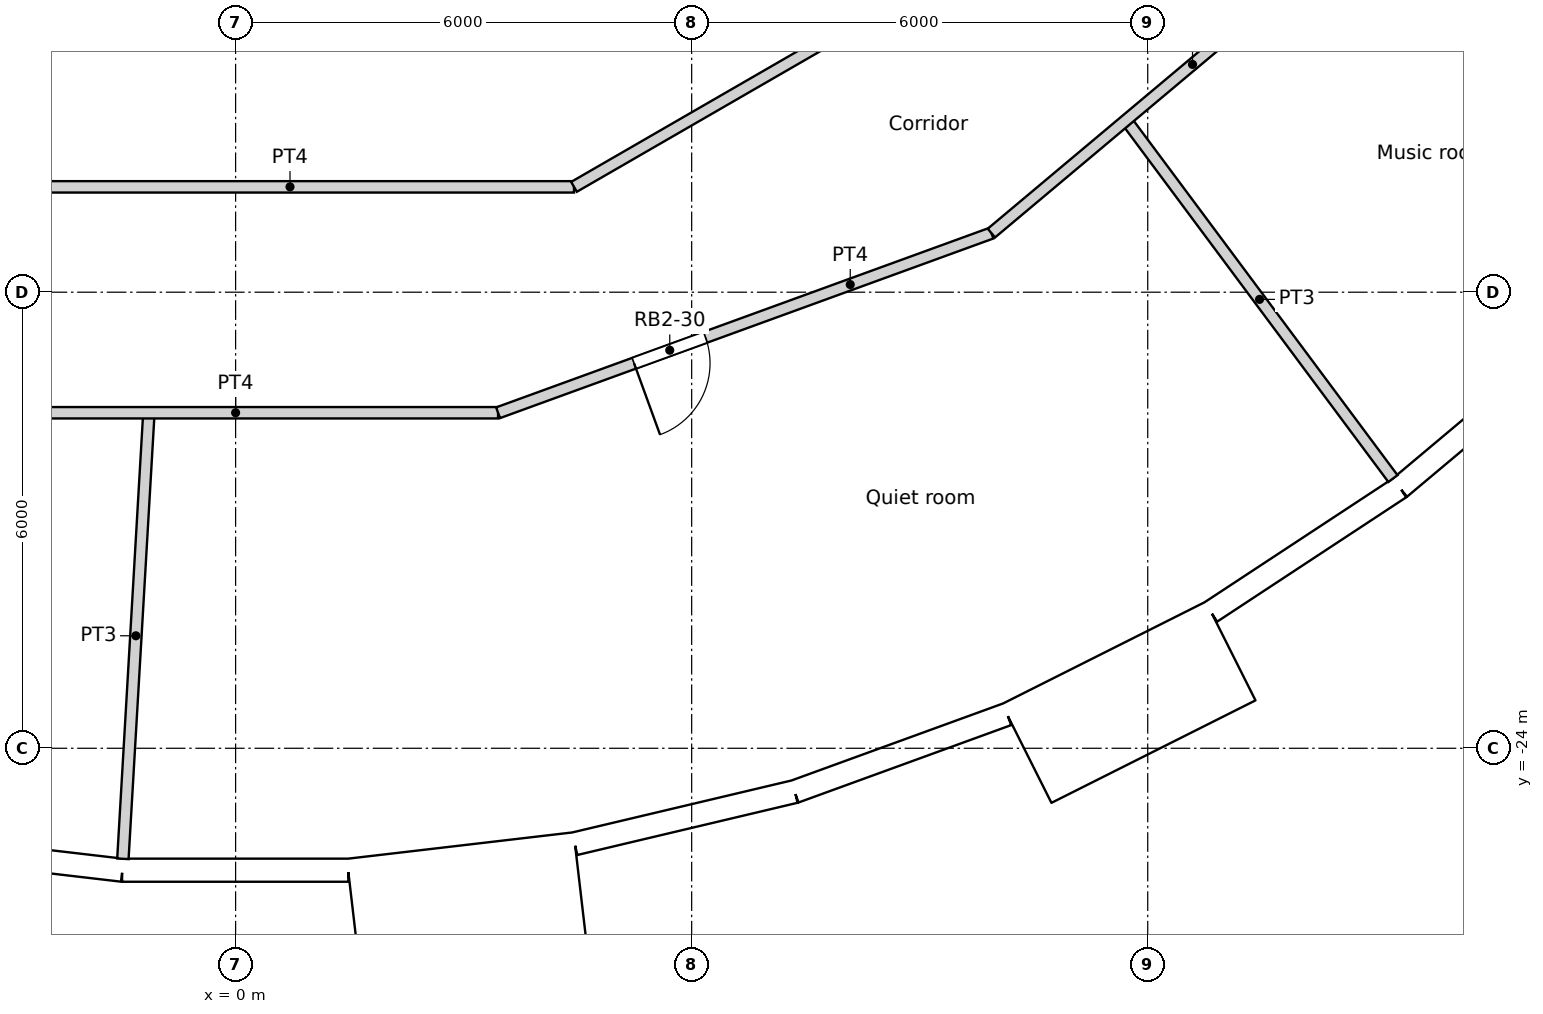
"""IFC4 building model, lengths in metres.
Left out: names, types, materials, properties, quantities, classifications, styles, units other than length and angle.
Written with IfcOpenShell. Run it as: python <this file> out.ifc"""

import sys

from ifc_helpers import new_model, si_unit, direction, frame, frame_2d, origin, origin_2d, place, context, subcontext, project, spatial, rectangle, circle, extrude, element, fill, save


model = new_model("IFC4")
c1 = context("Model", 3, precision=1e-05, world=origin(), true_north=direction((0.0, 1.0)))
c2 = subcontext(c1, "Body", "Model", "MODEL_VIEW")
j1 = project(units=[si_unit("LENGTHUNIT", "METRE"), si_unit("PLANEANGLEUNIT", "RADIAN")], contexts=[c1])
p1 = place(None, origin())
s1 = spatial("IfcSite", under=j1, at=p1, CompositionType="ELEMENT")
p2 = place(p1, origin())
s2 = spatial("IfcBuilding", under=s1, at=p2, CompositionType="ELEMENT")
p3 = place(p2, frame((0.0, 0.0, 136.8)))
s3 = spatial("IfcBuildingStorey", under=s2, at=p3, CompositionType="ELEMENT", Elevation=136.8)
for number, where, z_axis, x_axis in (
    (1, (-1.427, -24.506, 0.0), (0.0, 0.0, 1.0), (1.0, 0.0, 0.0)),
    (2, (4.263, -24.175, 0.0), (0.0, 0.0, 1.0), (1.0, 0.0, 0.0)),
    (3, (9.723, -22.54, 0.0), (0.0, 0.0, 1.0), (1.0, 0.0, 0.0)),
    (4, (14.659, -19.69, 0.0), (0.0, 0.0, 1.0), (1.0, 0.0, 0.0)),
):
    element("IfcColumn", number, at=place(p3, frame(where, z_axis=z_axis, x_axis=x_axis)), inside=s3, PredefinedType="COLUMN", context=c2, shape_type="SweptSolid", body=[
        extrude(circle(Radius=0.6, at=origin_2d()), origin(), (0.0, 0.0, 1.0), 3.6),
    ])
for number, where, z_axis, x_axis in (
    (5, (1.406, -18.77, 0.0), (0.0, 0.0, 1.0), (1.0, 0.0, 0.0)),
    (6, (6.876, -17.521, 0.0), (0.0, 0.0, 1.0), (1.0, 0.0, 0.0)),
    (7, (11.735, -14.716, 0.0), (0.0, 0.0, 1.0), (1.0, 0.0, 0.0)),
):
    element("IfcColumn", number, at=place(p3, frame(where, z_axis=z_axis, x_axis=x_axis)), inside=s3, PredefinedType="COLUMN", context=c2, shape_type="SweptSolid", body=[
        extrude(circle(Radius=0.65, at=origin_2d()), origin(), (0.0, 0.0, 1.0), 3.6),
    ])
p4 = place(p3, frame((-4.444, -25.259, 0.0), z_axis=(0.0, 0.0, 1.0), x_axis=(0.993245010522, -0.1160359818, 0.0)))
e8 = element("IfcWall", 8, at=p4, inside=s3, PredefinedType="SOLIDWALL", context=c2, shape_type="SweptSolid", body=[
    extrude(rectangle(XDim=2.973, YDim=0.3, at=frame_2d((1.486, 0.0))), origin(), (0.0, 0.0, 1.0), 2.8),
])
p5 = place(p4, frame((1.486, 0.0, 1.55)))
e9 = element("IfcOpeningElement", 9, at=p5, cuts=e8, PredefinedType="OPENING", context=c2, shape_type="SweptSolid", body=[
    extrude(circle(Radius=0.9, at=origin_2d()), frame((0.0, 0.16, 0.0), z_axis=(0.0, -1.0, 0.0), x_axis=(1.0, 0.0, 0.0)), (0.0, 0.0, 1.0), 0.32),
])
p6 = place(p3, frame((-1.491, -25.604, 0.0), z_axis=(0.0, 0.0, 1.0), x_axis=(1.0, 0.0, 0.0)))
e10 = element("IfcWall", 10, at=p6, inside=s3, PredefinedType="SOLIDWALL", context=c2, shape_type="SweptSolid", body=[
    extrude(rectangle(XDim=2.973, YDim=0.3, at=frame_2d((1.486, 0.0))), origin(), (0.0, 0.0, 1.0), 3.3),
])
p7 = place(p6, frame((1.486, 0.0, 1.55)))
e11 = element("IfcOpeningElement", 11, at=p7, cuts=e10, PredefinedType="OPENING", context=c2, shape_type="SweptSolid", body=[
    extrude(circle(Radius=0.9, at=origin_2d()), frame((0.0, 0.16, 0.0), z_axis=(0.0, -1.0, 0.0), x_axis=(1.0, 0.0, 0.0)), (0.0, 0.0, 1.0), 0.32),
])
p8 = place(p3, frame((1.549, -26.176, -0.3), z_axis=(0.0, 0.0, 1.0), x_axis=(0.9932342274, 0.116128246006, 0.0)))
e12 = element("IfcWall", 12, at=p8, inside=s3, PredefinedType="ELEMENTEDWALL", context=c2, shape_type="SweptSolid", body=[
    extrude(rectangle(XDim=3.0, YDim=1.45, at=frame_2d((1.5, 0.0))), origin(), (0.0, 0.0, 1.0), 3.6),
])
p9 = place(p8, frame((1.5, 0.0, 1.85)))
e13 = element("IfcOpeningElement", 13, at=p9, cuts=e12, PredefinedType="OPENING", context=c2, shape_type="SweptSolid", body=[
    extrude(circle(Radius=0.9, at=origin_2d()), frame((0.0, 0.735, 0.0), z_axis=(0.0, -1.0, 0.0), x_axis=(1.0, 0.0, 0.0)), (0.0, 0.0, 1.0), 1.47),
])
p10 = place(p3, frame((4.463, -25.256, 0.0), z_axis=(0.0, 0.0, 1.0), x_axis=(0.973045378923, 0.230613725862, 0.0)))
e14 = element("IfcWall", 14, at=p10, inside=s3, PredefinedType="SOLIDWALL", context=c2, shape_type="SweptSolid", body=[
    extrude(rectangle(XDim=2.973, YDim=0.3, at=frame_2d((1.486, 0.0))), origin(), (0.0, 0.0, 1.0), 2.8),
])
p11 = place(p10, frame((1.486, 0.0, 1.55)))
e15 = element("IfcOpeningElement", 15, at=p11, cuts=e14, PredefinedType="OPENING", context=c2, shape_type="SweptSolid", body=[
    extrude(circle(Radius=0.9, at=origin_2d()), frame((0.0, 0.16, 0.0), z_axis=(0.0, -1.0, 0.0), x_axis=(1.0, 0.0, 0.0)), (0.0, 0.0, 1.0), 0.32),
])
p12 = place(p3, frame((7.356, -24.57, 0.0), z_axis=(0.0, 0.0, 1.0), x_axis=(0.939690282133, 0.342026568652, 0.0)))
e16 = element("IfcWall", 16, at=p12, inside=s3, PredefinedType="SOLIDWALL", context=c2, shape_type="SweptSolid", body=[
    extrude(rectangle(XDim=2.973, YDim=0.3, at=frame_2d((1.486, 0.0))), origin(), (0.0, 0.0, 1.0), 3.3),
])
p13 = place(p12, frame((1.486, 0.0, 1.55)))
e17 = element("IfcOpeningElement", 17, at=p13, cuts=e16, PredefinedType="OPENING", context=c2, shape_type="SweptSolid", body=[
    extrude(circle(Radius=0.9, at=origin_2d()), frame((0.0, 0.16, 0.0), z_axis=(0.0, -1.0, 0.0), x_axis=(1.0, 0.0, 0.0)), (0.0, 0.0, 1.0), 0.32),
])
p14 = place(p3, frame((10.409, -24.068, -0.3), z_axis=(0.0, 0.0, 1.0), x_axis=(0.893628249713, 0.448807922518, 0.0)))
e18 = element("IfcWall", 18, at=p14, inside=s3, PredefinedType="ELEMENTEDWALL", context=c2, shape_type="SweptSolid", body=[
    extrude(rectangle(XDim=3.0, YDim=1.45, at=frame_2d((1.5, 0.0))), origin(), (0.0, 0.0, 1.0), 3.6),
])
p15 = place(p14, frame((1.5, 0.0, 1.85)))
e19 = element("IfcOpeningElement", 19, at=p15, cuts=e18, PredefinedType="OPENING", context=c2, shape_type="SweptSolid", body=[
    extrude(circle(Radius=0.9, at=origin_2d()), frame((0.0, 0.735, 0.0), z_axis=(0.0, -1.0, 0.0), x_axis=(1.0, 0.0, 0.0)), (0.0, 0.0, 1.0), 1.47),
])
p16 = place(p3, frame((12.832, -22.206, 0.0), z_axis=(0.0, 0.0, 1.0), x_axis=(0.835508361394, 0.54947773207, 0.0)))
e20 = element("IfcWall", 20, at=p16, inside=s3, PredefinedType="SOLIDWALL", context=c2, shape_type="SweptSolid", body=[
    extrude(rectangle(XDim=2.973, YDim=0.3, at=frame_2d((1.486, 0.0))), origin(), (0.0, 0.0, 1.0), 2.8),
])
p17 = place(p16, frame((1.486, 0.0, 1.55)))
e21 = element("IfcOpeningElement", 21, at=p17, cuts=e20, PredefinedType="OPENING", context=c2, shape_type="SweptSolid", body=[
    extrude(circle(Radius=0.9, at=origin_2d()), frame((0.0, 0.16, 0.0), z_axis=(0.0, -1.0, 0.0), x_axis=(1.0, 0.0, 0.0)), (0.0, 0.0, 1.0), 0.32),
])
p18 = place(p3, frame((15.316, -20.573, 0.0), z_axis=(0.0, 0.0, 1.0), x_axis=(0.766008913364, 0.642829950023, 0.0)))
e22 = element("IfcWall", 22, at=p18, inside=s3, PredefinedType="SOLIDWALL", context=c2, shape_type="SweptSolid", body=[
    extrude(rectangle(XDim=2.973, YDim=0.3, at=frame_2d((1.486, 0.0))), origin(), (0.0, 0.0, 1.0), 3.3),
])
p19 = place(p18, frame((1.486, 0.0, 1.55)))
e23 = element("IfcOpeningElement", 23, at=p19, cuts=e22, PredefinedType="OPENING", context=c2, shape_type="SweptSolid", body=[
    extrude(circle(Radius=0.9, at=origin_2d()), frame((0.0, 0.16, 0.0), z_axis=(0.0, -1.0, 0.0), x_axis=(1.0, 0.0, 0.0)), (0.0, 0.0, 1.0), 0.32),
])
p20 = place(p3, frame((9.943, -17.222, 0.0), z_axis=(0.0, 0.0, 1.0), x_axis=(0.766192104565, 0.642611592567, 0.0)))
e24 = element("IfcWall", 24, at=p20, inside=s3, PredefinedType="PARTITIONING", context=c2, shape_type="SweptSolid", body=[
    extrude(rectangle(XDim=6.906, YDim=0.15, at=frame_2d((3.453, 0.0))), origin(), (0.0, 0.0, 1.0), 3.3),
])
p21 = place(p3, frame((-3.021, -16.614, 0.0), z_axis=(0.0, 0.0, 1.0), x_axis=(1.0, 0.0, 0.0)))
e25 = element("IfcWall", 25, at=p21, inside=s3, PredefinedType="PARTITIONING", context=c2, shape_type="SweptSolid", body=[
    extrude(rectangle(XDim=7.473, YDim=0.15, at=frame_2d((3.736, 0.0))), origin(), (0.0, 0.0, 1.0), 3.3),
])
p22 = place(p3, frame((4.452, -16.614, 0.0), z_axis=(0.0, 0.0, 1.0), x_axis=(0.866005203721, 0.500034985904, 0.0)))
e26 = element("IfcWall", 26, at=p22, inside=s3, PredefinedType="PARTITIONING", context=c2, shape_type="SweptSolid", body=[
    extrude(rectangle(XDim=8.903, YDim=0.15, at=frame_2d((4.452, 0.0))), origin(), (0.0, 0.0, 1.0), 3.3),
])
p23 = place(p3, frame((-3.453, -19.586, 0.0), z_axis=(0.0, 0.0, 1.0), x_axis=(1.0, 0.0, 0.0)))
e27 = element("IfcWall", 27, at=p23, inside=s3, PredefinedType="PARTITIONING", context=c2, shape_type="SweptSolid", body=[
    extrude(rectangle(XDim=6.906, YDim=0.15, at=frame_2d((3.453, 0.0))), origin(), (0.0, 0.0, 1.0), 3.3),
])
p24 = place(p3, frame((3.453, -19.586, 0.0), z_axis=(0.0, 0.0, 1.0), x_axis=(0.939672634566, 0.342075050021, 0.0)))
e28 = element("IfcWall", 28, at=p24, inside=s3, PredefinedType="PARTITIONING", context=c2, shape_type="SweptSolid", body=[
    extrude(rectangle(XDim=6.908, YDim=0.15, at=frame_2d((3.454, 0.0))), origin(), (0.0, 0.0, 1.0), 3.3),
])
p25 = place(p24, frame((1.904, 0.0, 0.0)))
e29 = element("IfcOpeningElement", 29, at=p25, cuts=e28, PredefinedType="OPENING", context=c2, shape_type="SweptSolid", body=[
    extrude(rectangle(XDim=1.0, YDim=2.04, at=frame_2d((0.5, 1.02))), frame((0.0, 0.075, 0.0), z_axis=(0.0, -1.0, 0.0), x_axis=(1.0, 0.0, 0.0)), (0.0, 0.0, 1.0), 0.15),
])
p26 = place(p3, frame((-1.483, -25.454, 0.0), z_axis=(0.0, 0.0, 1.0), x_axis=(0.058147412668, 0.998308007781, 0.0)))
e30 = element("IfcWall", 30, at=p26, inside=s3, PredefinedType="PARTITIONING", context=c2, shape_type="SweptSolid", body=[
    extrude(rectangle(XDim=5.878, YDim=0.15, at=frame_2d((2.939, 0.0))), origin(), (0.0, 0.0, 1.0), 3.3),
])
p27 = place(p3, frame((11.716, -15.737, 0.0), z_axis=(0.0, 0.0, 1.0), x_axis=(0.597151875745, -0.802128192557, 0.0)))
e31 = element("IfcWall", 31, at=p27, inside=s3, PredefinedType="PARTITIONING", context=c2, shape_type="SweptSolid", body=[
    extrude(rectangle(XDim=5.878, YDim=0.15, at=frame_2d((2.939, 0.0))), origin(), (0.0, 0.0, 1.0), 3.3),
])
p28 = place(p5, origin())
e32 = element("IfcWindow", 32, at=p28, inside=s3, PartitioningType="SINGLE_PANEL", PredefinedType="WINDOW", context=c2, shape_type="SweptSolid", body=[
    extrude(circle(Radius=0.9, at=origin_2d()), frame((0.0, 0.12, 0.0), z_axis=(0.0, -1.0, 0.0), x_axis=(1.0, 0.0, 0.0)), (0.0, 0.0, 1.0), 0.1),
])
fill(e9, e32)
p29 = place(p7, origin())
e33 = element("IfcWindow", 33, at=p29, inside=s3, PartitioningType="SINGLE_PANEL", PredefinedType="WINDOW", context=c2, shape_type="SweptSolid", body=[
    extrude(circle(Radius=0.9, at=origin_2d()), frame((0.0, 0.12, 0.0), z_axis=(0.0, -1.0, 0.0), x_axis=(1.0, 0.0, 0.0)), (0.0, 0.0, 1.0), 0.1),
])
fill(e11, e33)
p30 = place(p9, origin())
e34 = element("IfcWindow", 34, at=p30, inside=s3, PartitioningType="SINGLE_PANEL", PredefinedType="WINDOW", context=c2, shape_type="SweptSolid", body=[
    extrude(circle(Radius=0.9, at=origin_2d()), frame((0.0, 0.695, 0.0), z_axis=(0.0, -1.0, 0.0), x_axis=(1.0, 0.0, 0.0)), (0.0, 0.0, 1.0), 0.1),
])
fill(e13, e34)
p31 = place(p11, origin())
e35 = element("IfcWindow", 35, at=p31, inside=s3, PartitioningType="SINGLE_PANEL", PredefinedType="WINDOW", context=c2, shape_type="SweptSolid", body=[
    extrude(circle(Radius=0.9, at=origin_2d()), frame((0.0, 0.12, 0.0), z_axis=(0.0, -1.0, 0.0), x_axis=(1.0, 0.0, 0.0)), (0.0, 0.0, 1.0), 0.1),
])
fill(e15, e35)
p32 = place(p13, origin())
e36 = element("IfcWindow", 36, at=p32, inside=s3, PartitioningType="SINGLE_PANEL", PredefinedType="WINDOW", context=c2, shape_type="SweptSolid", body=[
    extrude(circle(Radius=0.9, at=origin_2d()), frame((0.0, 0.12, 0.0), z_axis=(0.0, -1.0, 0.0), x_axis=(1.0, 0.0, 0.0)), (0.0, 0.0, 1.0), 0.1),
])
fill(e17, e36)
p33 = place(p15, origin())
e37 = element("IfcWindow", 37, at=p33, inside=s3, PartitioningType="SINGLE_PANEL", PredefinedType="WINDOW", context=c2, shape_type="SweptSolid", body=[
    extrude(circle(Radius=0.9, at=origin_2d()), frame((0.0, 0.695, 0.0), z_axis=(0.0, -1.0, 0.0), x_axis=(1.0, 0.0, 0.0)), (0.0, 0.0, 1.0), 0.1),
])
fill(e19, e37)
p34 = place(p17, origin())
e38 = element("IfcWindow", 38, at=p34, inside=s3, PartitioningType="SINGLE_PANEL", PredefinedType="WINDOW", context=c2, shape_type="SweptSolid", body=[
    extrude(circle(Radius=0.9, at=origin_2d()), frame((0.0, 0.12, 0.0), z_axis=(0.0, -1.0, 0.0), x_axis=(1.0, 0.0, 0.0)), (0.0, 0.0, 1.0), 0.1),
])
fill(e21, e38)
p35 = place(p19, origin())
e39 = element("IfcWindow", 39, at=p35, inside=s3, PartitioningType="SINGLE_PANEL", PredefinedType="WINDOW", context=c2, shape_type="SweptSolid", body=[
    extrude(circle(Radius=0.9, at=origin_2d()), frame((0.0, 0.12, 0.0), z_axis=(0.0, -1.0, 0.0), x_axis=(1.0, 0.0, 0.0)), (0.0, 0.0, 1.0), 0.1),
])
fill(e23, e39)
p36 = place(p25, origin())
e40 = element("IfcDoor", 40, at=p36, inside=s3, OperationType="SINGLE_SWING_RIGHT", PredefinedType="DOOR", context=c2, shape_type="SweptSolid", body=[
    extrude(rectangle(XDim=1.0, YDim=2.04, at=frame_2d((0.5, 1.02))), frame((0.0, 0.025, 0.0), z_axis=(0.0, -1.0, 0.0), x_axis=(1.0, 0.0, 0.0)), (0.0, 0.0, 1.0), 0.05),
])
fill(e29, e40)
save(model, sys.argv[1])
